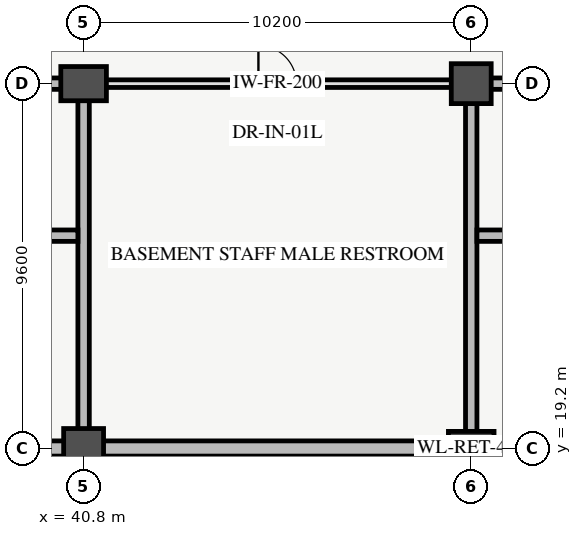
"""IFC4 building model, lengths in metres.
Left out: names, types, materials, properties, quantities, classifications, styles, units other than length and angle.
Written with IfcOpenShell. Run it as: python <this file> out.ifc"""

import sys

from ifc_helpers import new_model, si_unit, direction, frame, frame_2d, origin, origin_2d, place, context, subcontext, project, spatial, rectangle, extrude, element, fill, save


model = new_model("IFC4")
c1 = context("Model", 3, precision=1e-05, world=origin(), true_north=direction((0.0, 1.0)))
c2 = subcontext(c1, "Body", "Model", "MODEL_VIEW")
j1 = project(units=[si_unit("LENGTHUNIT", "METRE"), si_unit("PLANEANGLEUNIT", "RADIAN")], contexts=[c1])
p1 = place(None, origin())
s1 = spatial("IfcSite", under=j1, at=p1, CompositionType="ELEMENT")
p2 = place(p1, origin())
s2 = spatial("IfcBuilding", under=s1, at=p2, CompositionType="ELEMENT")
p3 = place(p2, frame((0.0, 0.0, -4.5)))
s3 = spatial("IfcBuildingStorey", under=s2, at=p3, CompositionType="ELEMENT", Elevation=-4.5)
p4 = place(p3, frame((40.8, 19.2, 0.0), z_axis=(0.0, 0.0, 1.0), x_axis=(1.0, 0.0, 0.0)))
e1 = element("IfcColumn", 1, at=p4, inside=s3, PredefinedType="COLUMN", context=c2, shape_type="SweptSolid", body=[
    extrude(rectangle(XDim=1.05, YDim=1.05, at=origin_2d()), origin(), (0.0, 0.0, 1.0), 4.5),
])
for number, where, z_axis, x_axis in (
    (2, (40.8, 28.8, 0.0), (0.0, 0.0, 1.0), (1.0, 0.0, 0.0)),
    (3, (51.0, 19.2, 0.0), (0.0, 0.0, 1.0), (1.0, 0.0, 0.0)),
):
    element("IfcColumn", number, at=place(p3, frame(where, z_axis=z_axis, x_axis=x_axis)), inside=s3, PredefinedType="COLUMN", context=c2, shape_type="SweptSolid", body=[
        extrude(rectangle(XDim=1.2, YDim=0.9, at=origin_2d()), origin(), (0.0, 0.0, 1.0), 4.5),
    ])
p5 = place(p3, frame((51.0, 28.8, 0.0), z_axis=(0.0, 0.0, 1.0), x_axis=(1.0, 0.0, 0.0)))
e4 = element("IfcColumn", 4, at=p5, inside=s3, PredefinedType="COLUMN", context=c2, shape_type="SweptSolid", body=[
    extrude(rectangle(XDim=1.05, YDim=1.05, at=origin_2d()), origin(), (0.0, 0.0, 1.0), 4.5),
])
p6 = place(p3, frame((0.0, 19.2, 0.0), z_axis=(0.0, 0.0, 1.0), x_axis=(1.0, 0.0, 0.0)))
e5 = element("IfcWall", 5, at=p6, inside=s3, PredefinedType="SOLIDWALL", context=c2, shape_type="SweptSolid", body=[
    extrude(rectangle(XDim=102.0, YDim=0.4, at=frame_2d((51.0, 0.0))), origin(), (0.0, 0.0, 1.0), 4.1),
])
p7 = place(p3, frame((51.0, 28.8, 0.0), z_axis=(0.0, 0.0, 1.0), x_axis=(1.0, 0.0, 0.0)))
e6 = element("IfcWall", 6, at=p7, inside=s3, PredefinedType="SHEAR", context=c2, shape_type="SweptSolid", body=[
    extrude(rectangle(XDim=10.2, YDim=0.3, at=frame_2d((5.1, 0.0))), origin(), (0.0, 0.0, 1.0), 4.5),
])
p8 = place(p3, frame((51.0, 19.2, 0.0), z_axis=(0.0, 0.0, 1.0), x_axis=(0.0, 1.0, 0.0)))
e7 = element("IfcWall", 7, at=p8, inside=s3, PredefinedType="SHEAR", context=c2, shape_type="SweptSolid", body=[
    extrude(rectangle(XDim=9.6, YDim=0.3, at=frame_2d((4.8, 0.0))), origin(), (0.0, 0.0, 1.0), 4.5),
])
p9 = place(p3, frame((51.15, 24.8, 0.0), z_axis=(0.0, 0.0, 1.0), x_axis=(1.0, 0.0, 0.0)))
e8 = element("IfcWall", 8, at=p9, inside=s3, PredefinedType="SHEAR", context=c2, shape_type="SweptSolid", body=[
    extrude(rectangle(XDim=9.9, YDim=0.3, at=frame_2d((4.95, 0.0))), origin(), (0.0, 0.0, 1.0), 4.5),
])
p10 = place(p3, frame((30.6, 28.8, 0.0), z_axis=(0.0, 0.0, 1.0), x_axis=(1.0, 0.0, 0.0)))
e9 = element("IfcWall", 9, at=p10, inside=s3, PredefinedType="SHEAR", context=c2, shape_type="SweptSolid", body=[
    extrude(rectangle(XDim=10.2, YDim=0.3, at=frame_2d((5.1, 0.0))), origin(), (0.0, 0.0, 1.0), 4.5),
])
p11 = place(p3, frame((40.8, 19.2, 0.0), z_axis=(0.0, 0.0, 1.0), x_axis=(0.0, 1.0, 0.0)))
e10 = element("IfcWall", 10, at=p11, inside=s3, PredefinedType="SHEAR", context=c2, shape_type="SweptSolid", body=[
    extrude(rectangle(XDim=9.6, YDim=0.3, at=frame_2d((4.8, 0.0))), origin(), (0.0, 0.0, 1.0), 4.5),
])
p12 = place(p3, frame((30.75, 24.8, 0.0), z_axis=(0.0, 0.0, 1.0), x_axis=(1.0, 0.0, 0.0)))
e11 = element("IfcWall", 11, at=p12, inside=s3, PredefinedType="SHEAR", context=c2, shape_type="SweptSolid", body=[
    extrude(rectangle(XDim=9.9, YDim=0.3, at=frame_2d((4.95, 0.0))), origin(), (0.0, 0.0, 1.0), 4.5),
])
p13 = place(p3, frame((41.2, 28.8, 0.0), z_axis=(0.0, 0.0, 1.0), x_axis=(1.0, 0.0, 0.0)))
e12 = element("IfcWall", 12, at=p13, inside=s3, PredefinedType="PARTITIONING", context=c2, shape_type="SweptSolid", body=[
    extrude(rectangle(XDim=9.4, YDim=0.2, at=frame_2d((4.7, 0.0))), origin(), (0.0, 0.0, 1.0), 2.75),
])
p14 = place(p13, frame((4.2, 0.0, 0.0)))
e13 = element("IfcOpeningElement", 13, at=p14, cuts=e12, PredefinedType="OPENING", context=c2, shape_type="SweptSolid", body=[
    extrude(rectangle(XDim=1.0, YDim=2.15, at=frame_2d((0.5, 1.075))), frame((0.0, 0.11, 0.0), z_axis=(0.0, -1.0, 0.0), x_axis=(1.0, 0.0, 0.0)), (0.0, 0.0, 1.0), 0.22),
])
p15 = place(p14, origin())
e14 = element("IfcDoor", 14, at=p15, inside=s3, OperationType="SINGLE_SWING_LEFT", PredefinedType="DOOR", context=c2, shape_type="SweptSolid", body=[
    extrude(rectangle(XDim=1.0, YDim=2.15, at=frame_2d((0.5, 1.075))), frame((0.0, 0.025, 0.0), z_axis=(0.0, -1.0, 0.0), x_axis=(1.0, 0.0, 0.0)), (0.0, 0.0, 1.0), 0.05),
])
fill(e13, e14)
save(model, sys.argv[1])
